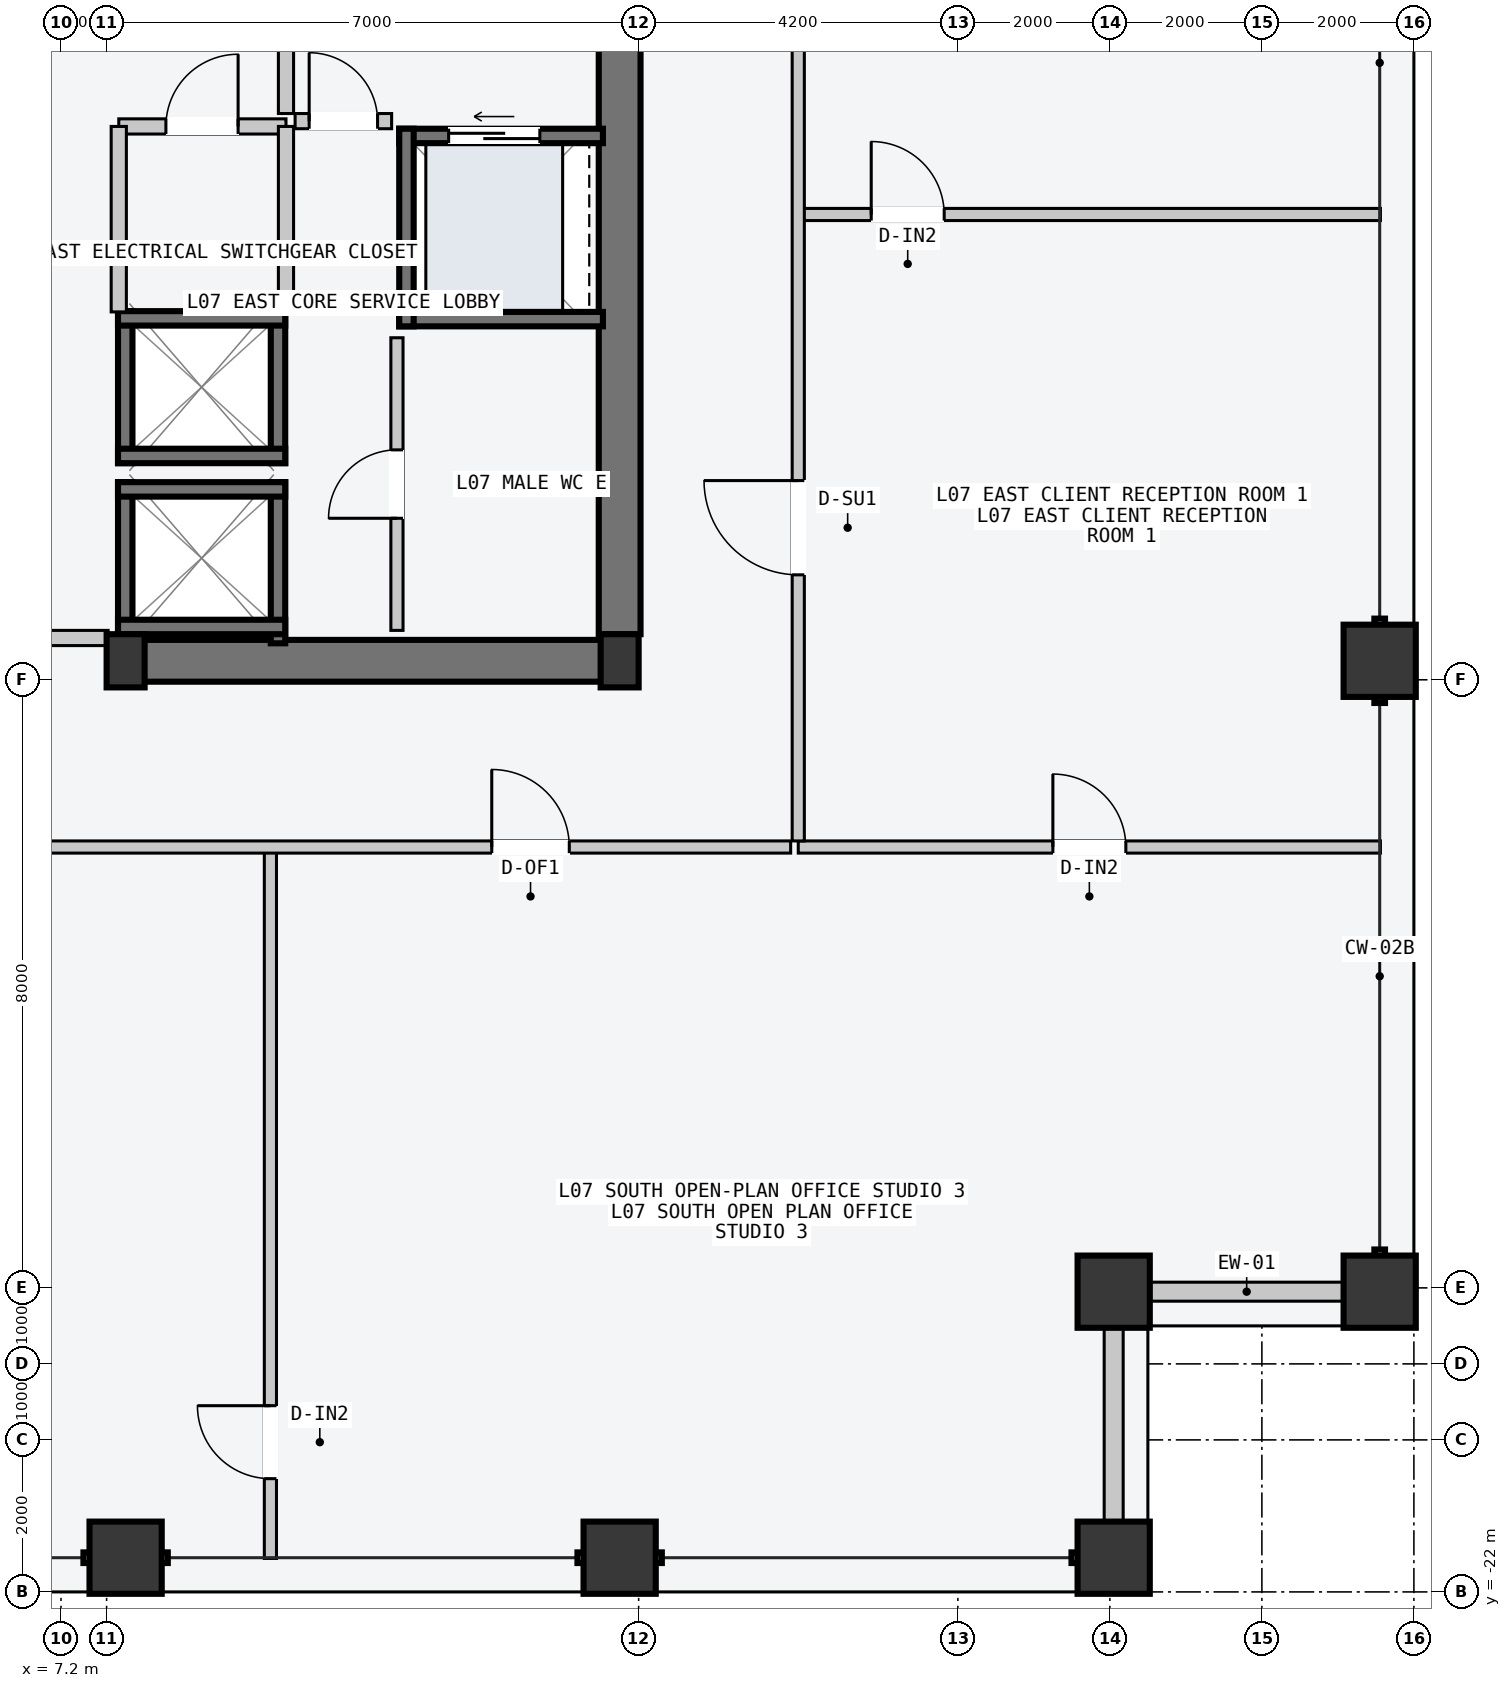
"""IFC4 building model, lengths in metres.
Left out: names, types, materials, properties, quantities, classifications, styles, units other than length and angle.
Written with IfcOpenShell. Run it as: python <this file> out.ifc"""

import sys

from ifc_helpers import new_model, si_unit, direction, frame, frame_2d, origin, origin_2d, place, context, subcontext, project, spatial, rectangle, hollow_rectangle, i_section, extrude, element, fill, save


model = new_model("IFC4")
c1 = context("Model", 3, precision=1e-05, world=origin(), true_north=direction((0.0, 1.0)))
c2 = subcontext(c1, "Body", "Model", "MODEL_VIEW")
j1 = project(units=[si_unit("LENGTHUNIT", "METRE"), si_unit("PLANEANGLEUNIT", "RADIAN")], contexts=[c1])
p1 = place(None, origin())
s1 = spatial("IfcSite", under=j1, at=p1, CompositionType="ELEMENT")
p2 = place(p1, origin())
s2 = spatial("IfcBuilding", under=s1, at=p2, CompositionType="ELEMENT")
p3 = place(p2, frame((0.0, 0.0, 31.2)))
s3 = spatial("IfcBuildingStorey", under=s2, at=p3, CompositionType="ELEMENT", Elevation=31.2)
p4 = place(p3, frame((8.07, -9.75, -0.2), z_axis=(0.0, 0.0, 1.0), x_axis=(1.0, 0.0, 0.0)))
e1 = element("IfcWall", 1, at=p4, inside=s3, PredefinedType="SHEAR", context=c2, shape_type="SweptSolid", body=[
    extrude(rectangle(XDim=6.46, YDim=0.55, at=frame_2d((3.23, 0.0))), origin(), (0.0, 0.0, 1.0), 3.6),
])
p5 = place(p3, frame((14.55, -9.4, -0.2), z_axis=(0.0, 0.0, 1.0), x_axis=(0.0, 1.0, 0.0)))
e2 = element("IfcWall", 2, at=p5, inside=s3, PredefinedType="SHEAR", context=c2, shape_type="SweptSolid", body=[
    extrude(rectangle(XDim=9.05, YDim=0.55, at=frame_2d((4.525, 0.0))), origin(), (0.0, 0.0, 1.0), 3.6),
])
for number, where, z_axis, x_axis in (
    (3, (8.05, -9.75, 0.0), (0.0, 0.0, 1.0), (1.0, 0.0, 0.0)),
    (4, (14.55, -9.75, 0.0), (0.0, 0.0, 1.0), (1.0, 0.0, 0.0)),
):
    element("IfcColumn", number, at=place(p3, frame(where, z_axis=z_axis, x_axis=x_axis)), inside=s3, PredefinedType="COLUMN", context=c2, shape_type="SweptSolid", body=[
        extrude(i_section(OverallWidth=0.5, OverallDepth=0.7, WebThickness=0.028, FlangeThickness=0.045, at=origin_2d()), origin(), (0.0, 0.0, 1.0), 3.6),
    ])
for number, where, z_axis, x_axis in (
    (5, (8.05, -21.55, 0.0), (0.0, 0.0, 1.0), (1.0, 0.0, 0.0)),
    (6, (14.55, -21.55, 0.0), (0.0, 0.0, 1.0), (1.0, 0.0, 0.0)),
    (7, (21.05, -21.55, 0.0), (0.0, 0.0, 1.0), (1.0, 0.0, 0.0)),
    (8, (24.55, -18.05, 0.0), (0.0, 0.0, 1.0), (0.0, 1.0, 0.0)),
    (9, (24.55, -9.75, 0.0), (0.0, 0.0, 1.0), (0.0, 1.0, 0.0)),
    (10, (21.05, -18.05, 0.0), (0.0, 0.0, 1.0), (1.0, 0.0, 0.0)),
):
    element("IfcColumn", number, at=place(p3, frame(where, z_axis=z_axis, x_axis=x_axis)), inside=s3, PredefinedType="COLUMN", context=c2, shape_type="SweptSolid", body=[
        extrude(hollow_rectangle(XDim=0.95, YDim=0.95, WallThickness=0.048, at=origin_2d()), origin(), (0.0, 0.0, 1.0), 3.6),
    ])
for number, where, z_axis, x_axis in (
    (11, (21.535, -18.05, 0.0), (0.0, 0.0, 1.0), (1.0, 0.0, 0.0)),
    (12, (21.05, -21.065, 0.0), (0.0, 0.0, 1.0), (0.0, 1.0, 0.0)),
):
    element("IfcWall", number, at=place(p3, frame(where, z_axis=z_axis, x_axis=x_axis)), inside=s3, PredefinedType="STANDARD", context=c2, shape_type="SweptSolid", body=[
        extrude(rectangle(XDim=2.53, YDim=0.25, at=frame_2d((1.265, 0.0))), origin(), (0.0, 0.0, 1.0), 2.7),
    ])
for number, where, z_axis, x_axis in (
    (13, (8.045, -9.52, -0.2), (0.0, 0.0, 1.0), (0.0, 1.0, 0.0)),
    (14, (10.055, -9.52, -0.2), (0.0, 0.0, 1.0), (0.0, 1.0, 0.0)),
):
    element("IfcWall", number, at=place(p3, frame(where, z_axis=z_axis, x_axis=x_axis)), inside=s3, PredefinedType="SOLIDWALL", context=c2, shape_type="SweptSolid", body=[
        extrude(rectangle(XDim=2.12, YDim=0.19, at=frame_2d((1.06, 0.0))), origin(), (0.0, 0.0, 1.0), 3.6),
    ])
for number, where, z_axis, x_axis in (
    (15, (7.95, -7.495, -0.2), (0.0, 0.0, 1.0), (1.0, 0.0, 0.0)),
    (16, (7.95, -9.305, -0.2), (0.0, 0.0, 1.0), (1.0, 0.0, 0.0)),
):
    element("IfcWall", number, at=place(p3, frame(where, z_axis=z_axis, x_axis=x_axis)), inside=s3, PredefinedType="SOLIDWALL", context=c2, shape_type="SweptSolid", body=[
        extrude(rectangle(XDim=2.2, YDim=0.19, at=frame_2d((1.1, 0.0))), origin(), (0.0, 0.0, 1.0), 3.6),
    ])
for number, where, z_axis, x_axis in (
    (17, (8.045, -7.15, -0.2), (0.0, 0.0, 1.0), (0.0, 1.0, 0.0)),
    (18, (10.055, -7.15, -0.2), (0.0, 0.0, 1.0), (0.0, 1.0, 0.0)),
):
    element("IfcWall", number, at=place(p3, frame(where, z_axis=z_axis, x_axis=x_axis)), inside=s3, PredefinedType="SOLIDWALL", context=c2, shape_type="SweptSolid", body=[
        extrude(rectangle(XDim=2.0, YDim=0.19, at=frame_2d((1.0, 0.0))), origin(), (0.0, 0.0, 1.0), 3.6),
    ])
for number, where, z_axis, x_axis in (
    (19, (7.95, -5.245, -0.2), (0.0, 0.0, 1.0), (1.0, 0.0, 0.0)),
    (20, (7.95, -7.055, -0.2), (0.0, 0.0, 1.0), (1.0, 0.0, 0.0)),
):
    element("IfcWall", number, at=place(p3, frame(where, z_axis=z_axis, x_axis=x_axis)), inside=s3, PredefinedType="SOLIDWALL", context=c2, shape_type="SweptSolid", body=[
        extrude(rectangle(XDim=2.2, YDim=0.19, at=frame_2d((1.1, 0.0))), origin(), (0.0, 0.0, 1.0), 3.6),
    ])
p6 = place(p3, frame((11.65, -2.845, -0.2), z_axis=(0.0, 0.0, 1.0), x_axis=(1.0, 0.0, 0.0)))
e21 = element("IfcWall", 21, at=p6, inside=s3, PredefinedType="SOLIDWALL", context=c2, shape_type="SweptSolid", body=[
    extrude(rectangle(XDim=2.68, YDim=0.19, at=frame_2d((1.34, 0.0))), origin(), (0.0, 0.0, 1.0), 3.6),
])
p7 = place(p6, frame((0.65, 0.0, 0.2)))
e22 = element("IfcOpeningElement", 22, at=p7, cuts=e21, PredefinedType="OPENING", context=c2, shape_type="SweptSolid", body=[
    extrude(rectangle(XDim=1.2, YDim=2.2, at=frame_2d((0.6, 1.1))), frame((0.0, 0.105, 0.0), z_axis=(0.0, -1.0, 0.0), x_axis=(1.0, 0.0, 0.0)), (0.0, 0.0, 1.0), 0.21),
])
p8 = place(p3, frame((11.65, -5.255, -0.2), z_axis=(0.0, 0.0, 1.0), x_axis=(1.0, 0.0, 0.0)))
e23 = element("IfcWall", 23, at=p8, inside=s3, PredefinedType="SOLIDWALL", context=c2, shape_type="SweptSolid", body=[
    extrude(rectangle(XDim=2.68, YDim=0.19, at=frame_2d((1.34, 0.0))), origin(), (0.0, 0.0, 1.0), 3.6),
])
p9 = place(p3, frame((11.745, -5.35, -0.2), z_axis=(0.0, 0.0, 1.0), x_axis=(0.0, 1.0, 0.0)))
e24 = element("IfcWall", 24, at=p9, inside=s3, PredefinedType="SOLIDWALL", context=c2, shape_type="SweptSolid", body=[
    extrude(rectangle(XDim=2.6, YDim=0.19, at=frame_2d((1.3, 0.0))), origin(), (0.0, 0.0, 1.0), 3.6),
])
p10 = place(p3, frame((6.02, -9.45, 0.0), z_axis=(0.0, 0.0, 1.0), x_axis=(1.0, 0.0, 0.0)))
e25 = element("IfcWall", 25, at=p10, inside=s3, PredefinedType="PARTITIONING", context=c2, shape_type="SweptSolid", body=[
    extrude(rectangle(XDim=1.8, YDim=0.2, at=frame_2d((0.9, 0.0))), origin(), (0.0, 0.0, 1.0), 3.4),
])
p11 = place(p3, frame((10.16, -2.55, 0.0), z_axis=(0.0, 0.0, 1.0), x_axis=(0.0, 1.0, 0.0)))
e26 = element("IfcWall", 26, at=p11, inside=s3, PredefinedType="PARTITIONING", context=c2, shape_type="SweptSolid", body=[
    extrude(rectangle(XDim=3.4, YDim=0.2, at=frame_2d((1.7, 0.0))), origin(), (0.0, 0.0, 1.0), 3.4),
])
p12 = place(p11, frame((1.3, 0.0, 0.0)))
e27 = element("IfcOpeningElement", 27, at=p12, cuts=e26, PredefinedType="OPENING", context=c2, shape_type="SweptSolid", body=[
    extrude(rectangle(XDim=1.1, YDim=2.15, at=frame_2d((0.55, 1.075))), frame((0.0, 0.11, 0.0), z_axis=(0.0, -1.0, 0.0), x_axis=(1.0, 0.0, 0.0)), (0.0, 0.0, 1.0), 0.22),
])
p13 = place(p3, frame((10.28, -2.65, 0.0), z_axis=(0.0, 0.0, 1.0), x_axis=(1.0, 0.0, 0.0)))
e28 = element("IfcWall", 28, at=p13, inside=s3, PredefinedType="PARTITIONING", context=c2, shape_type="SweptSolid", body=[
    extrude(rectangle(XDim=1.27, YDim=0.2, at=frame_2d((0.635, 0.0))), origin(), (0.0, 0.0, 1.0), 3.4),
])
p14 = place(p13, frame((0.185, 0.0, 0.0)))
e29 = element("IfcOpeningElement", 29, at=p14, cuts=e28, PredefinedType="OPENING", context=c2, shape_type="SweptSolid", body=[
    extrude(rectangle(XDim=0.9, YDim=2.15, at=frame_2d((0.45, 1.075))), frame((0.0, 0.11, 0.0), z_axis=(0.0, -1.0, 0.0), x_axis=(1.0, 0.0, 0.0)), (0.0, 0.0, 1.0), 0.22),
])
p15 = place(p3, frame((7.96, -2.72, 0.0), z_axis=(0.0, 0.0, 1.0), x_axis=(1.0, 0.0, 0.0)))
e30 = element("IfcWall", 30, at=p15, inside=s3, PredefinedType="PARTITIONING", context=c2, shape_type="SweptSolid", body=[
    extrude(rectangle(XDim=2.2, YDim=0.2, at=frame_2d((1.1, 0.0))), origin(), (0.0, 0.0, 1.0), 3.4),
])
p16 = place(p15, frame((0.62, 0.0, 0.0)))
e31 = element("IfcOpeningElement", 31, at=p16, cuts=e30, PredefinedType="OPENING", context=c2, shape_type="SweptSolid", body=[
    extrude(rectangle(XDim=0.95, YDim=2.1, at=frame_2d((0.475, 1.05))), frame((0.0, 0.11, 0.0), z_axis=(0.0, -1.0, 0.0), x_axis=(1.0, 0.0, 0.0)), (0.0, 0.0, 1.0), 0.22),
])
for number, where, z_axis, x_axis in (
    (32, (7.96, -5.16, 0.0), (0.0, 0.0, 1.0), (0.0, 1.0, 0.0)),
    (33, (10.16, -5.16, 0.0), (0.0, 0.0, 1.0), (0.0, 1.0, 0.0)),
):
    element("IfcWall", number, at=place(p3, frame(where, z_axis=z_axis, x_axis=x_axis)), inside=s3, PredefinedType="PARTITIONING", context=c2, shape_type="SweptSolid", body=[
        extrude(rectangle(XDim=2.44, YDim=0.2, at=frame_2d((1.22, 0.0))), origin(), (0.0, 0.0, 1.0), 3.4),
    ])
p17 = place(p3, frame((11.62, -9.35, 0.0), z_axis=(0.0, 0.0, 1.0), x_axis=(0.0, 1.0, 0.0)))
e34 = element("IfcWall", 34, at=p17, inside=s3, PredefinedType="PARTITIONING", context=c2, shape_type="SweptSolid", body=[
    extrude(rectangle(XDim=3.85, YDim=0.16, at=frame_2d((1.925, 0.0))), origin(), (0.0, 0.0, 1.0), 3.4),
])
p18 = place(p17, frame((1.475, 0.0, 0.0)))
e35 = element("IfcOpeningElement", 35, at=p18, cuts=e34, PredefinedType="OPENING", context=c2, shape_type="SweptSolid", body=[
    extrude(rectangle(XDim=0.9, YDim=2.15, at=frame_2d((0.45, 1.075))), frame((0.0, 0.09, 0.0), z_axis=(0.0, -1.0, 0.0), x_axis=(1.0, 0.0, 0.0)), (0.0, 0.0, 1.0), 0.18),
])
p19 = place(p3, frame((9.955, -21.56, 0.0), z_axis=(0.0, 0.0, 1.0), x_axis=(0.0, 1.0, 0.0)))
e36 = element("IfcWall", 36, at=p19, inside=s3, PredefinedType="PARTITIONING", context=c2, shape_type="SweptSolid", body=[
    extrude(rectangle(XDim=9.3, YDim=0.16, at=frame_2d((4.65, 0.0))), origin(), (0.0, 0.0, 1.0), 3.4),
])
p20 = place(p19, frame((1.05, 0.0, 0.0)))
e37 = element("IfcOpeningElement", 37, at=p20, cuts=e36, PredefinedType="OPENING", context=c2, shape_type="SweptSolid", body=[
    extrude(rectangle(XDim=0.96, YDim=2.18, at=frame_2d((0.48, 1.09))), frame((0.0, 0.09, 0.0), z_axis=(0.0, -1.0, 0.0), x_axis=(1.0, 0.0, 0.0)), (0.0, 0.0, 1.0), 0.18),
])
p21 = place(p3, frame((-16.8, -12.2, 0.0), z_axis=(0.0, 0.0, 1.0), x_axis=(1.0, 0.0, 0.0)))
e38 = element("IfcWall", 38, at=p21, inside=s3, PredefinedType="PARTITIONING", context=c2, shape_type="SweptSolid", body=[
    extrude(rectangle(XDim=33.6, YDim=0.16, at=frame_2d((16.8, 0.0))), origin(), (0.0, 0.0, 1.0), 3.4),
])
p22 = place(p21, frame((6.755, 0.0, 0.0)))
e39 = element("IfcOpeningElement", 39, at=p22, cuts=e38, PredefinedType="OPENING", context=c2, shape_type="SweptSolid", body=[
    extrude(rectangle(XDim=0.9, YDim=2.15, at=frame_2d((0.45, 1.075))), frame((0.0, 0.09, 0.0), z_axis=(0.0, -1.0, 0.0), x_axis=(1.0, 0.0, 0.0)), (0.0, 0.0, 1.0), 0.18),
])
p23 = place(p21, frame((20.103, 0.0, 0.0)))
e40 = element("IfcOpeningElement", 40, at=p23, cuts=e38, PredefinedType="OPENING", context=c2, shape_type="SweptSolid", body=[
    extrude(rectangle(XDim=0.96, YDim=2.18, at=frame_2d((0.48, 1.09))), frame((0.0, 0.09, 0.0), z_axis=(0.0, -1.0, 0.0), x_axis=(1.0, 0.0, 0.0)), (0.0, 0.0, 1.0), 0.18),
])
p24 = place(p21, frame((29.667, 0.0, 0.0)))
e41 = element("IfcOpeningElement", 41, at=p24, cuts=e38, PredefinedType="OPENING", context=c2, shape_type="SweptSolid", body=[
    extrude(rectangle(XDim=1.02, YDim=2.2, at=frame_2d((0.51, 1.1))), frame((0.0, 0.09, 0.0), z_axis=(0.0, -1.0, 0.0), x_axis=(1.0, 0.0, 0.0)), (0.0, 0.0, 1.0), 0.18),
])
p25 = place(p3, frame((16.9, -12.2, 0.0), z_axis=(0.0, 0.0, 1.0), x_axis=(1.0, 0.0, 0.0)))
e42 = element("IfcWall", 42, at=p25, inside=s3, PredefinedType="PARTITIONING", context=c2, shape_type="SweptSolid", body=[
    extrude(rectangle(XDim=7.66, YDim=0.16, at=frame_2d((3.83, 0.0))), origin(), (0.0, 0.0, 1.0), 3.4),
])
p26 = place(p25, frame((3.35, 0.0, 0.0)))
e43 = element("IfcOpeningElement", 43, at=p26, cuts=e42, PredefinedType="OPENING", context=c2, shape_type="SweptSolid", body=[
    extrude(rectangle(XDim=0.96, YDim=2.18, at=frame_2d((0.48, 1.09))), frame((0.0, 0.09, 0.0), z_axis=(0.0, -1.0, 0.0), x_axis=(1.0, 0.0, 0.0)), (0.0, 0.0, 1.0), 0.18),
])
p27 = place(p3, frame((16.96, -3.878, 0.0), z_axis=(0.0, 0.0, 1.0), x_axis=(1.0, 0.0, 0.0)))
e44 = element("IfcWall", 44, at=p27, inside=s3, PredefinedType="PARTITIONING", context=c2, shape_type="SweptSolid", body=[
    extrude(rectangle(XDim=7.6, YDim=0.16, at=frame_2d((3.8, 0.0))), origin(), (0.0, 0.0, 1.0), 3.4),
])
p28 = place(p27, frame((0.9, 0.0, 0.0)))
e45 = element("IfcOpeningElement", 45, at=p28, cuts=e44, PredefinedType="OPENING", context=c2, shape_type="SweptSolid", body=[
    extrude(rectangle(XDim=0.96, YDim=2.18, at=frame_2d((0.48, 1.09))), frame((0.0, 0.09, 0.0), z_axis=(0.0, -1.0, 0.0), x_axis=(1.0, 0.0, 0.0)), (0.0, 0.0, 1.0), 0.18),
])
p29 = place(p3, frame((16.9, -12.12, 0.0), z_axis=(0.0, 0.0, 1.0), x_axis=(0.0, 1.0, 0.0)))
e46 = element("IfcWall", 46, at=p29, inside=s3, PredefinedType="PARTITIONING", context=c2, shape_type="SweptSolid", body=[
    extrude(rectangle(XDim=24.24, YDim=0.16, at=frame_2d((12.12, 0.0))), origin(), (0.0, 0.0, 1.0), 3.4),
])
p30 = place(p29, frame((3.501, 0.0, 0.0)))
e47 = element("IfcOpeningElement", 47, at=p30, cuts=e46, PredefinedType="OPENING", context=c2, shape_type="SweptSolid", body=[
    extrude(rectangle(XDim=1.24, YDim=2.24, at=frame_2d((0.62, 1.12))), frame((0.0, 0.09, 0.0), z_axis=(0.0, -1.0, 0.0), x_axis=(1.0, 0.0, 0.0)), (0.0, 0.0, 1.0), 0.18),
])
p31 = place(p29, frame((15.541, 0.0, 0.0)))
e48 = element("IfcOpeningElement", 48, at=p31, cuts=e46, PredefinedType="OPENING", context=c2, shape_type="SweptSolid", body=[
    extrude(rectangle(XDim=1.4, YDim=2.2, at=frame_2d((0.7, 1.1))), frame((0.0, 0.09, 0.0), z_axis=(0.0, -1.0, 0.0), x_axis=(1.0, 0.0, 0.0)), (0.0, 0.0, 1.0), 0.18),
])
p32 = place(p7, origin())
e49 = element("IfcDoor", 49, at=p32, inside=s3, OperationType="SLIDING_TO_LEFT", PredefinedType="DOOR", context=c2, shape_type="SweptSolid", body=[
    extrude(rectangle(XDim=1.2, YDim=2.2, at=frame_2d((0.6, 1.1))), frame((0.0, 0.025, 0.0), z_axis=(0.0, -1.0, 0.0), x_axis=(1.0, 0.0, 0.0)), (0.0, 0.0, 1.0), 0.05),
])
fill(e22, e49)
p33 = place(p14, origin())
e50 = element("IfcDoor", 50, at=p33, inside=s3, OperationType="SINGLE_SWING_LEFT", PredefinedType="DOOR", context=c2, shape_type="SweptSolid", body=[
    extrude(rectangle(XDim=0.9, YDim=2.15, at=frame_2d((0.45, 1.075))), frame((0.0, 0.025, 0.0), z_axis=(0.0, -1.0, 0.0), x_axis=(1.0, 0.0, 0.0)), (0.0, 0.0, 1.0), 0.05),
])
fill(e29, e50)
p34 = place(p16, origin())
e51 = element("IfcDoor", 51, at=p34, inside=s3, OperationType="SINGLE_SWING_RIGHT", PredefinedType="DOOR", context=c2, shape_type="SweptSolid", body=[
    extrude(rectangle(XDim=0.95, YDim=2.1, at=frame_2d((0.475, 1.05))), frame((0.0, 0.025, 0.0), z_axis=(0.0, -1.0, 0.0), x_axis=(1.0, 0.0, 0.0)), (0.0, 0.0, 1.0), 0.05),
])
fill(e31, e51)
p35 = place(p18, origin())
e52 = element("IfcDoor", 52, at=p35, inside=s3, OperationType="SINGLE_SWING_LEFT", PredefinedType="DOOR", context=c2, shape_type="SweptSolid", body=[
    extrude(rectangle(XDim=0.9, YDim=2.15, at=frame_2d((0.45, 1.075))), frame((0.0, 0.025, 0.0), z_axis=(0.0, -1.0, 0.0), x_axis=(1.0, 0.0, 0.0)), (0.0, 0.0, 1.0), 0.05),
])
fill(e35, e52)
p36 = place(p20, origin())
e53 = element("IfcDoor", 53, at=p36, inside=s3, OperationType="SINGLE_SWING_RIGHT", PredefinedType="DOOR", context=c2, shape_type="SweptSolid", body=[
    extrude(rectangle(XDim=0.96, YDim=2.18, at=frame_2d((0.48, 1.09))), frame((0.0, 0.025, 0.0), z_axis=(0.0, -1.0, 0.0), x_axis=(1.0, 0.0, 0.0)), (0.0, 0.0, 1.0), 0.05),
])
fill(e37, e53)
p37 = place(p24, origin())
e54 = element("IfcDoor", 54, at=p37, inside=s3, OperationType="SINGLE_SWING_LEFT", PredefinedType="DOOR", context=c2, shape_type="SweptSolid", body=[
    extrude(rectangle(XDim=1.02, YDim=2.2, at=frame_2d((0.51, 1.1))), frame((0.0, 0.025, 0.0), z_axis=(0.0, -1.0, 0.0), x_axis=(1.0, 0.0, 0.0)), (0.0, 0.0, 1.0), 0.05),
])
fill(e41, e54)
p38 = place(p26, origin())
e55 = element("IfcDoor", 55, at=p38, inside=s3, OperationType="SINGLE_SWING_LEFT", PredefinedType="DOOR", context=c2, shape_type="SweptSolid", body=[
    extrude(rectangle(XDim=0.96, YDim=2.18, at=frame_2d((0.48, 1.09))), frame((0.0, 0.025, 0.0), z_axis=(0.0, -1.0, 0.0), x_axis=(1.0, 0.0, 0.0)), (0.0, 0.0, 1.0), 0.05),
])
fill(e43, e55)
p39 = place(p28, origin())
e56 = element("IfcDoor", 56, at=p39, inside=s3, OperationType="SINGLE_SWING_LEFT", PredefinedType="DOOR", context=c2, shape_type="SweptSolid", body=[
    extrude(rectangle(XDim=0.96, YDim=2.18, at=frame_2d((0.48, 1.09))), frame((0.0, 0.025, 0.0), z_axis=(0.0, -1.0, 0.0), x_axis=(1.0, 0.0, 0.0)), (0.0, 0.0, 1.0), 0.05),
])
fill(e45, e56)
p40 = place(p30, origin())
e57 = element("IfcDoor", 57, at=p40, inside=s3, OperationType="SINGLE_SWING_RIGHT", PredefinedType="DOOR", context=c2, shape_type="SweptSolid", body=[
    extrude(rectangle(XDim=1.24, YDim=2.24, at=frame_2d((0.62, 1.12))), frame((0.0, 0.025, 0.0), z_axis=(0.0, -1.0, 0.0), x_axis=(1.0, 0.0, 0.0)), (0.0, 0.0, 1.0), 0.05),
])
fill(e47, e57)
save(model, sys.argv[1])
